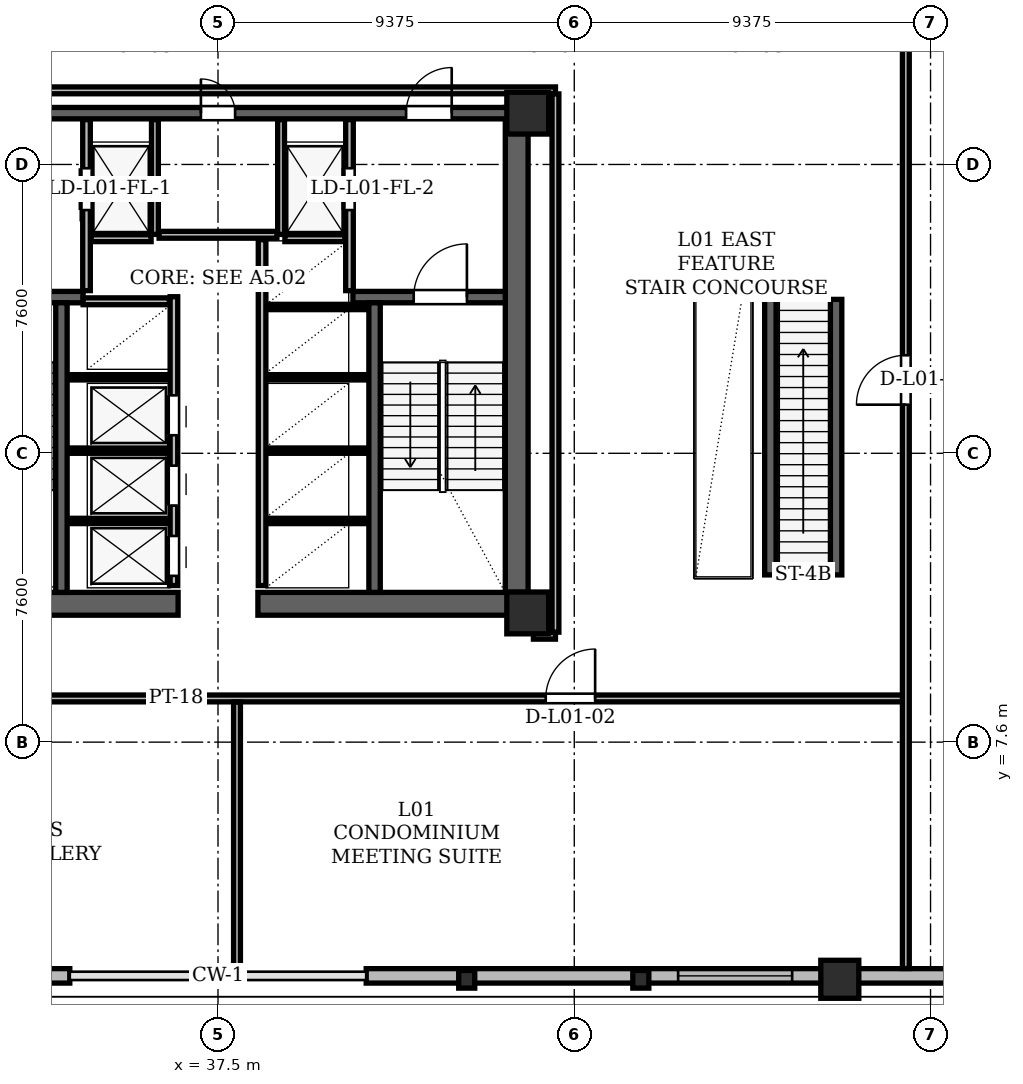
"""IFC4 building model, lengths in metres.
Left out: names, types, materials, properties, quantities, classifications, styles, units other than length and angle.
Written with IfcOpenShell. Run it as: python <this file> out.ifc"""

import sys

from ifc_helpers import new_model, si_unit, direction, frame, frame_2d, origin, origin_2d, place, context, subcontext, project, spatial, rectangle, hollow_rectangle, i_section, extrude, element, fill, save


model = new_model("IFC4")
c1 = context("Model", 3, precision=1e-05, world=origin(), true_north=direction((0.0, 1.0)))
c2 = subcontext(c1, "Body", "Model", "MODEL_VIEW")
j1 = project(units=[si_unit("LENGTHUNIT", "METRE"), si_unit("PLANEANGLEUNIT", "RADIAN")], contexts=[c1])
p1 = place(None, origin())
s1 = spatial("IfcSite", under=j1, at=p1, CompositionType="ELEMENT")
p2 = place(p1, origin())
s2 = spatial("IfcBuilding", under=s1, at=p2, CompositionType="ELEMENT")
p3 = place(p2, frame((0.0, 0.0, 5.4)))
s3 = spatial("IfcBuildingStorey", under=s2, at=p3, CompositionType="ELEMENT", Elevation=5.4)
for number, where, z_axis, x_axis in (
    (1, (45.65, 11.0, 0.0), (0.0, 0.0, 1.0), (1.0, 0.0, 0.0)),
    (2, (45.65, 24.15, 0.0), (0.0, 0.0, 1.0), (1.0, 0.0, 0.0)),
):
    element("IfcColumn", number, at=place(p3, frame(where, z_axis=z_axis, x_axis=x_axis)), inside=s3, PredefinedType="COLUMN", context=c2, shape_type="SweptSolid", body=[
        extrude(hollow_rectangle(XDim=1.1, YDim=1.1, WallThickness=0.09, at=origin_2d()), origin(), (0.0, 0.0, 1.0), 4.5),
    ])
p4 = place(p3, frame((53.862, 1.36, 0.005), z_axis=(0.0, 0.0, 1.0), x_axis=(1.0, 0.0, 0.0)))
e3 = element("IfcColumn", 3, at=p4, inside=s3, PredefinedType="COLUMN", context=c2, shape_type="SweptSolid", body=[
    extrude(hollow_rectangle(XDim=1.0, YDim=1.0, WallThickness=0.085, at=origin_2d()), origin(), (0.0, 0.0, 1.0), 4.491),
])
for number, where, z_axis, x_axis in (
    (4, (44.045, 1.36, 0.005), (0.0, 0.0, 1.0), (1.0, 0.0, 0.0)),
    (5, (48.626, 1.36, 0.005), (0.0, 0.0, 1.0), (1.0, 0.0, 0.0)),
):
    element("IfcColumn", number, at=place(p3, frame(where, z_axis=z_axis, x_axis=x_axis)), inside=s3, PredefinedType="COLUMN", context=c2, shape_type="SweptSolid", body=[
        extrude(i_section(OverallWidth=0.422, OverallDepth=0.465, WebThickness=0.045, FlangeThickness=0.072, at=origin_2d()), origin(), (0.0, 0.0, 1.0), 4.491),
    ])
p5 = place(p3, frame((45.36, 11.0, 0.0), z_axis=(0.0, 0.0, 1.0), x_axis=(0.0, 1.0, 0.0)))
e6 = element("IfcWall", 6, at=p5, inside=s3, PredefinedType="SHEAR", context=c2, shape_type="SweptSolid", body=[
    extrude(rectangle(XDim=13.3, YDim=0.6, at=frame_2d((6.65, 0.0))), origin(), (0.0, 0.0, 1.0), 4.22),
])
for number, where, z_axis, x_axis in (
    (7, (29.35, 11.24, 0.0), (0.0, 0.0, 1.0), (1.0, 0.0, 0.0)),
    (8, (38.55, 11.24, 0.0), (0.0, 0.0, 1.0), (1.0, 0.0, 0.0)),
):
    element("IfcWall", number, at=place(p3, frame(where, z_axis=z_axis, x_axis=x_axis)), inside=s3, PredefinedType="SHEAR", context=c2, shape_type="SweptSolid", body=[
        extrude(rectangle(XDim=7.1, YDim=0.6, at=frame_2d((3.55, 0.0))), origin(), (0.0, 0.0, 1.0), 4.22),
    ])
p6 = place(p3, frame((29.65, 24.15, 0.0), z_axis=(0.0, 0.0, 1.0), x_axis=(1.0, 0.0, 0.0)))
e9 = element("IfcWall", 9, at=p6, inside=s3, PredefinedType="SHEAR", context=c2, shape_type="SweptSolid", body=[
    extrude(rectangle(XDim=15.7, YDim=0.3, at=frame_2d((7.85, 0.0))), origin(), (0.0, 0.0, 1.0), 4.22),
])
p7 = place(p6, frame((1.7, 0.0, 0.0)))
e10 = element("IfcOpeningElement", 10, at=p7, cuts=e9, PredefinedType="OPENING", context=c2, shape_type="SweptSolid", body=[
    extrude(rectangle(XDim=1.2, YDim=2.2, at=frame_2d((0.6, 1.1))), frame((0.0, 0.15, 0.0), z_axis=(0.0, -1.0, 0.0), x_axis=(1.0, 0.0, 0.0)), (0.0, 0.0, 1.0), 0.3),
])
p8 = place(p6, frame((12.8, 0.0, 0.0)))
e11 = element("IfcOpeningElement", 11, at=p8, cuts=e9, PredefinedType="OPENING", context=c2, shape_type="SweptSolid", body=[
    extrude(rectangle(XDim=1.2, YDim=2.2, at=frame_2d((0.6, 1.1))), frame((0.0, 0.15, 0.0), z_axis=(0.0, -1.0, 0.0), x_axis=(1.0, 0.0, 0.0)), (0.0, 0.0, 1.0), 0.3),
])
p9 = place(p6, frame((7.4, 0.0, 0.0)))
e12 = element("IfcOpeningElement", 12, at=p9, cuts=e9, PredefinedType="OPENING", context=c2, shape_type="SweptSolid", body=[
    extrude(rectangle(XDim=0.9, YDim=2.05, at=frame_2d((0.45, 1.025))), frame((0.0, 0.15, 0.0), z_axis=(0.0, -1.0, 0.0), x_axis=(1.0, 0.0, 0.0)), (0.0, 0.0, 1.0), 0.3),
])
p10 = place(p3, frame((29.94, 19.31, 0.0), z_axis=(0.0, 0.0, 1.0), x_axis=(1.0, 0.0, 0.0)))
e13 = element("IfcWall", 13, at=p10, inside=s3, PredefinedType="SHEAR", context=c2, shape_type="SweptSolid", body=[
    extrude(rectangle(XDim=4.01, YDim=0.3, at=frame_2d((2.005, 0.0))), origin(), (0.0, 0.0, 1.0), 4.22),
])
p11 = place(p10, frame((1.01, 0.0, 0.0)))
e14 = element("IfcOpeningElement", 14, at=p11, cuts=e13, PredefinedType="OPENING", context=c2, shape_type="SweptSolid", body=[
    extrude(rectangle(XDim=1.4, YDim=2.2, at=frame_2d((0.7, 1.1))), frame((0.0, 0.15, 0.0), z_axis=(0.0, -1.0, 0.0), x_axis=(1.0, 0.0, 0.0)), (0.0, 0.0, 1.0), 0.3),
])
p12 = place(p3, frame((41.05, 19.31, 0.0), z_axis=(0.0, 0.0, 1.0), x_axis=(1.0, 0.0, 0.0)))
e15 = element("IfcWall", 15, at=p12, inside=s3, PredefinedType="SHEAR", context=c2, shape_type="SweptSolid", body=[
    extrude(rectangle(XDim=4.01, YDim=0.3, at=frame_2d((2.005, 0.0))), origin(), (0.0, 0.0, 1.0), 4.22),
])
p13 = place(p12, frame((1.6, 0.0, 0.0)))
e16 = element("IfcOpeningElement", 16, at=p13, cuts=e15, PredefinedType="OPENING", context=c2, shape_type="SweptSolid", body=[
    extrude(rectangle(XDim=1.4, YDim=2.2, at=frame_2d((0.7, 1.1))), frame((0.0, 0.15, 0.0), z_axis=(0.0, -1.0, 0.0), x_axis=(1.0, 0.0, 0.0)), (0.0, 0.0, 1.0), 0.3),
])
for number, where, z_axis, x_axis in (
    (17, (33.38, 11.54, 0.0), (0.0, 0.0, 1.0), (0.0, 1.0, 0.0)),
    (18, (41.62, 11.54, 0.0), (0.0, 0.0, 1.0), (0.0, 1.0, 0.0)),
):
    element("IfcWall", number, at=place(p3, frame(where, z_axis=z_axis, x_axis=x_axis)), inside=s3, PredefinedType="SHEAR", context=c2, shape_type="SweptSolid", body=[
        extrude(rectangle(XDim=7.62, YDim=0.3, at=frame_2d((3.81, 0.0))), origin(), (0.0, 0.0, 1.0), 4.22),
    ])
for number, where, z_axis, x_axis in (
    (19, (52.035, 12.0, 0.0), (0.0, 0.0, 1.0), (0.0, 1.0, 0.0)),
    (20, (53.765, 12.0, 0.0), (0.0, 0.0, 1.0), (0.0, 1.0, 0.0)),
):
    element("IfcWall", number, at=place(p3, frame(where, z_axis=z_axis, x_axis=x_axis)), inside=s3, PredefinedType="SHEAR", context=c2, shape_type="SweptSolid", body=[
        extrude(rectangle(XDim=7.25, YDim=0.3, at=frame_2d((3.625, 0.0))), origin(), (0.0, 0.0, 1.0), 4.22),
    ])
p14 = place(p3, frame((-1.072, 1.45, 0.0), z_axis=(0.0, 0.0, 1.0), x_axis=(1.0, 0.0, 0.0)))
e21 = element("IfcWall", 21, at=p14, inside=s3, PredefinedType="SOLIDWALL", context=c2, shape_type="SweptSolid", body=[
    extrude(rectangle(XDim=34.672, YDim=0.38, at=frame_2d((17.336, 0.0))), origin(), (0.0, 0.0, 1.0), 3.283),
])
p15 = place(p14, frame((8.208, 0.0, 0.85)))
e22 = element("IfcOpeningElement", 22, at=p15, cuts=e21, PredefinedType="OPENING", context=c2, shape_type="SweptSolid", body=[
    extrude(rectangle(XDim=3.0, YDim=2.25, at=frame_2d((1.5, 1.125))), frame((0.0, 0.19, 0.0), z_axis=(0.0, -1.0, 0.0), x_axis=(1.0, 0.0, 0.0)), (0.0, 0.0, 1.0), 0.38),
])
p16 = place(p14, frame((23.464, 0.0, 0.85)))
e23 = element("IfcOpeningElement", 23, at=p16, cuts=e21, PredefinedType="OPENING", context=c2, shape_type="SweptSolid", body=[
    extrude(rectangle(XDim=3.0, YDim=2.25, at=frame_2d((1.5, 1.125))), frame((0.0, 0.19, 0.0), z_axis=(0.0, -1.0, 0.0), x_axis=(1.0, 0.0, 0.0)), (0.0, 0.0, 1.0), 0.38),
])
p17 = place(p3, frame((41.4, 1.45, 0.0), z_axis=(0.0, 0.0, 1.0), x_axis=(1.0, 0.0, 0.0)))
e24 = element("IfcWall", 24, at=p17, inside=s3, PredefinedType="SOLIDWALL", context=c2, shape_type="SweptSolid", body=[
    extrude(rectangle(XDim=34.672, YDim=0.38, at=frame_2d((17.336, 0.0))), origin(), (0.0, 0.0, 1.0), 3.283),
])
p18 = place(p17, frame((8.208, 0.0, 0.85)))
e25 = element("IfcOpeningElement", 25, at=p18, cuts=e24, PredefinedType="OPENING", context=c2, shape_type="SweptSolid", body=[
    extrude(rectangle(XDim=3.0, YDim=2.25, at=frame_2d((1.5, 1.125))), frame((0.0, 0.19, 0.0), z_axis=(0.0, -1.0, 0.0), x_axis=(1.0, 0.0, 0.0)), (0.0, 0.0, 1.0), 0.38),
])
p19 = place(p17, frame((23.464, 0.0, 0.85)))
e26 = element("IfcOpeningElement", 26, at=p19, cuts=e24, PredefinedType="OPENING", context=c2, shape_type="SweptSolid", body=[
    extrude(rectangle(XDim=3.0, YDim=2.25, at=frame_2d((1.5, 1.125))), frame((0.0, 0.19, 0.0), z_axis=(0.0, -1.0, 0.0), x_axis=(1.0, 0.0, 0.0)), (0.0, 0.0, 1.0), 0.38),
])
p20 = place(p3, frame((34.04, 19.48, 0.0), z_axis=(0.0, 0.0, 1.0), x_axis=(0.0, 1.0, 0.0)))
e27 = element("IfcWall", 27, at=p20, inside=s3, PredefinedType="PARTITIONING", context=c2, shape_type="SweptSolid", body=[
    extrude(rectangle(XDim=4.5, YDim=0.2, at=frame_2d((2.25, 0.0))), origin(), (0.0, 0.0, 1.0), 3.26),
])
p21 = place(p20, frame((2.12, 0.0, 0.0)))
e28 = element("IfcOpeningElement", 28, at=p21, cuts=e27, PredefinedType="OPENING", context=c2, shape_type="SweptSolid", body=[
    extrude(rectangle(XDim=1.1, YDim=2.2, at=frame_2d((0.55, 1.1))), frame((0.0, 0.1, 0.0), z_axis=(0.0, -1.0, 0.0), x_axis=(1.0, 0.0, 0.0)), (0.0, 0.0, 1.0), 0.2),
])
p22 = place(p3, frame((35.84, 20.96, 0.0), z_axis=(0.0, 0.0, 1.0), x_axis=(0.0, 1.0, 0.0)))
e29 = element("IfcWall", 29, at=p22, inside=s3, PredefinedType="PARTITIONING", context=c2, shape_type="SweptSolid", body=[
    extrude(rectangle(XDim=3.02, YDim=0.18, at=frame_2d((1.51, 0.0))), origin(), (0.0, 0.0, 1.0), 3.26),
])
p23 = place(p3, frame((34.16, 20.86, 0.0), z_axis=(0.0, 0.0, 1.0), x_axis=(1.0, 0.0, 0.0)))
e30 = element("IfcWall", 30, at=p23, inside=s3, PredefinedType="PARTITIONING", context=c2, shape_type="SweptSolid", body=[
    extrude(rectangle(XDim=1.58, YDim=0.18, at=frame_2d((0.79, 0.0))), origin(), (0.0, 0.0, 1.0), 4.22),
])
p24 = place(p3, frame((40.96, 19.48, 0.0), z_axis=(0.0, 0.0, 1.0), x_axis=(0.0, 1.0, 0.0)))
e31 = element("IfcWall", 31, at=p24, inside=s3, PredefinedType="PARTITIONING", context=c2, shape_type="SweptSolid", body=[
    extrude(rectangle(XDim=4.5, YDim=0.2, at=frame_2d((2.25, 0.0))), origin(), (0.0, 0.0, 1.0), 3.26),
])
p25 = place(p24, frame((2.12, 0.0, 0.0)))
e32 = element("IfcOpeningElement", 32, at=p25, cuts=e31, PredefinedType="OPENING", context=c2, shape_type="SweptSolid", body=[
    extrude(rectangle(XDim=1.1, YDim=2.2, at=frame_2d((0.55, 1.1))), frame((0.0, 0.1, 0.0), z_axis=(0.0, -1.0, 0.0), x_axis=(1.0, 0.0, 0.0)), (0.0, 0.0, 1.0), 0.2),
])
p26 = place(p3, frame((39.16, 20.96, 0.0), z_axis=(0.0, 0.0, 1.0), x_axis=(0.0, 1.0, 0.0)))
e33 = element("IfcWall", 33, at=p26, inside=s3, PredefinedType="PARTITIONING", context=c2, shape_type="SweptSolid", body=[
    extrude(rectangle(XDim=3.02, YDim=0.18, at=frame_2d((1.51, 0.0))), origin(), (0.0, 0.0, 1.0), 3.26),
])
p27 = place(p3, frame((39.26, 20.86, 0.0), z_axis=(0.0, 0.0, 1.0), x_axis=(1.0, 0.0, 0.0)))
e34 = element("IfcWall", 34, at=p27, inside=s3, PredefinedType="PARTITIONING", context=c2, shape_type="SweptSolid", body=[
    extrude(rectangle(XDim=1.58, YDim=0.18, at=frame_2d((0.79, 0.0))), origin(), (0.0, 0.0, 1.0), 4.22),
])
p28 = place(p3, frame((36.34, 11.72, 0.0), z_axis=(0.0, 0.0, 1.0), x_axis=(0.0, 1.0, 0.0)))
e35 = element("IfcWall", 35, at=p28, inside=s3, PredefinedType="PARTITIONING", context=c2, shape_type="SweptSolid", body=[
    extrude(rectangle(XDim=7.6, YDim=0.2, at=frame_2d((3.8, 0.0))), origin(), (0.0, 0.0, 1.0), 4.22),
])
p29 = place(p28, frame((0.255, 0.0, 0.0)))
e36 = element("IfcOpeningElement", 36, at=p29, cuts=e35, PredefinedType="OPENING", context=c2, shape_type="SweptSolid", body=[
    extrude(rectangle(XDim=1.05, YDim=2.15, at=frame_2d((0.525, 1.075))), frame((0.0, 0.1, 0.0), z_axis=(0.0, -1.0, 0.0), x_axis=(1.0, 0.0, 0.0)), (0.0, 0.0, 1.0), 0.2),
])
p30 = place(p28, frame((2.105, 0.0, 0.0)))
e37 = element("IfcOpeningElement", 37, at=p30, cuts=e35, PredefinedType="OPENING", context=c2, shape_type="SweptSolid", body=[
    extrude(rectangle(XDim=1.05, YDim=2.15, at=frame_2d((0.525, 1.075))), frame((0.0, 0.1, 0.0), z_axis=(0.0, -1.0, 0.0), x_axis=(1.0, 0.0, 0.0)), (0.0, 0.0, 1.0), 0.2),
])
p31 = place(p28, frame((3.955, 0.0, 0.0)))
e38 = element("IfcOpeningElement", 38, at=p31, cuts=e35, PredefinedType="OPENING", context=c2, shape_type="SweptSolid", body=[
    extrude(rectangle(XDim=1.05, YDim=2.15, at=frame_2d((0.525, 1.075))), frame((0.0, 0.1, 0.0), z_axis=(0.0, -1.0, 0.0), x_axis=(1.0, 0.0, 0.0)), (0.0, 0.0, 1.0), 0.2),
])
p32 = place(p3, frame((33.95, 19.2, 0.0), z_axis=(0.0, 0.0, 1.0), x_axis=(1.0, 0.0, 0.0)))
e39 = element("IfcWall", 39, at=p32, inside=s3, PredefinedType="PARTITIONING", context=c2, shape_type="SweptSolid", body=[
    extrude(rectangle(XDim=2.27, YDim=0.18, at=frame_2d((1.135, 0.0))), origin(), (0.0, 0.0, 1.0), 4.22),
])
for number, where, z_axis, x_axis in (
    (40, (33.56, 13.42, 0.0), (0.0, 0.0, 1.0), (1.0, 0.0, 0.0)),
    (41, (33.56, 15.27, 0.0), (0.0, 0.0, 1.0), (1.0, 0.0, 0.0)),
    (42, (33.56, 17.2, 0.0), (0.0, 0.0, 1.0), (1.0, 0.0, 0.0)),
):
    element("IfcWall", number, at=place(p3, frame(where, z_axis=z_axis, x_axis=x_axis)), inside=s3, PredefinedType="PARTITIONING", context=c2, shape_type="SweptSolid", body=[
        extrude(rectangle(XDim=2.66, YDim=0.14, at=frame_2d((1.33, 0.0))), origin(), (0.0, 0.0, 1.0), 4.22),
    ])
p33 = place(p3, frame((38.66, 11.72, 0.0), z_axis=(0.0, 0.0, 1.0), x_axis=(0.0, 1.0, 0.0)))
e43 = element("IfcWall", 43, at=p33, inside=s3, PredefinedType="PARTITIONING", context=c2, shape_type="SweptSolid", body=[
    extrude(rectangle(XDim=9.1, YDim=0.2, at=frame_2d((4.55, 0.0))), origin(), (0.0, 0.0, 1.0), 4.22),
])
for number, where, z_axis, x_axis in (
    (44, (38.78, 13.42, 0.0), (0.0, 0.0, 1.0), (1.0, 0.0, 0.0)),
    (45, (38.78, 15.27, 0.0), (0.0, 0.0, 1.0), (1.0, 0.0, 0.0)),
    (46, (38.78, 17.2, 0.0), (0.0, 0.0, 1.0), (1.0, 0.0, 0.0)),
    (47, (38.78, 19.05, 0.0), (0.0, 0.0, 1.0), (1.0, 0.0, 0.0)),
):
    element("IfcWall", number, at=place(p3, frame(where, z_axis=z_axis, x_axis=x_axis)), inside=s3, PredefinedType="PARTITIONING", context=c2, shape_type="SweptSolid", body=[
        extrude(rectangle(XDim=2.66, YDim=0.14, at=frame_2d((1.33, 0.0))), origin(), (0.0, 0.0, 1.0), 4.22),
    ])
p34 = place(p3, frame((35.95, 20.95, 0.0), z_axis=(0.0, 0.0, 1.0), x_axis=(1.0, 0.0, 0.0)))
e48 = element("IfcWall", 48, at=p34, inside=s3, PredefinedType="PARTITIONING", context=c2, shape_type="SweptSolid", body=[
    extrude(rectangle(XDim=3.1, YDim=0.18, at=frame_2d((1.55, 0.0))), origin(), (0.0, 0.0, 1.0), 4.22),
])
p35 = place(p3, frame((14.03, 8.75, 0.0), z_axis=(0.0, 0.0, 1.0), x_axis=(1.0, 0.0, 0.0)))
e49 = element("IfcWall", 49, at=p35, inside=s3, PredefinedType="PARTITIONING", context=c2, shape_type="SweptSolid", body=[
    extrude(rectangle(XDim=41.57, YDim=0.18, at=frame_2d((20.785, 0.0))), origin(), (0.0, 0.0, 1.0), 3.283),
])
p36 = place(p35, frame((11.336, 0.0, 0.0)))
e50 = element("IfcOpeningElement", 50, at=p36, cuts=e49, PredefinedType="OPENING", context=c2, shape_type="SweptSolid", body=[
    extrude(rectangle(XDim=1.3, YDim=2.2, at=frame_2d((0.65, 1.1))), frame((0.0, 0.09, 0.0), z_axis=(0.0, -1.0, 0.0), x_axis=(1.0, 0.0, 0.0)), (0.0, 0.0, 1.0), 0.18),
])
p37 = place(p35, frame((32.094, 0.0, 0.0)))
e51 = element("IfcOpeningElement", 51, at=p37, cuts=e49, PredefinedType="OPENING", context=c2, shape_type="SweptSolid", body=[
    extrude(rectangle(XDim=1.3, YDim=2.2, at=frame_2d((0.65, 1.1))), frame((0.0, 0.09, 0.0), z_axis=(0.0, -1.0, 0.0), x_axis=(1.0, 0.0, 0.0)), (0.0, 0.0, 1.0), 0.18),
])
p38 = place(p3, frame((45.8, 10.4, 0.0), z_axis=(0.0, 0.0, 1.0), x_axis=(1.0, 0.0, 0.0)))
e52 = element("IfcWall", 52, at=p38, inside=s3, PredefinedType="PARTITIONING", context=c2, shape_type="SweptSolid", body=[
    extrude(rectangle(XDim=0.58, YDim=0.18, at=frame_2d((0.29, 0.0))), origin(), (0.0, 0.0, 1.0), 3.283),
])
p39 = place(p3, frame((28.62, 24.75, 0.0), z_axis=(0.0, 0.0, 1.0), x_axis=(1.0, 0.0, 0.0)))
e53 = element("IfcWall", 53, at=p39, inside=s3, PredefinedType="PARTITIONING", context=c2, shape_type="SweptSolid", body=[
    extrude(rectangle(XDim=17.76, YDim=0.18, at=frame_2d((8.88, 0.0))), origin(), (0.0, 0.0, 1.0), 3.283),
])
p40 = place(p3, frame((38.0, 1.564, 0.0), z_axis=(0.0, 0.0, 1.0), x_axis=(0.0, 1.0, 0.0)))
e54 = element("IfcWall", 54, at=p40, inside=s3, PredefinedType="PARTITIONING", context=c2, shape_type="SweptSolid", body=[
    extrude(rectangle(XDim=7.092, YDim=0.18, at=frame_2d((3.546, 0.0))), origin(), (0.0, 0.0, 1.0), 4.22),
])
p41 = place(p3, frame((46.38, 10.494, 0.0), z_axis=(0.0, 0.0, 1.0), x_axis=(0.0, 1.0, 0.0)))
e55 = element("IfcWall", 55, at=p41, inside=s3, PredefinedType="PARTITIONING", context=c2, shape_type="SweptSolid", body=[
    extrude(rectangle(XDim=14.162, YDim=0.18, at=frame_2d((7.081, 0.0))), origin(), (0.0, 0.0, 1.0), 4.22),
])
p42 = place(p3, frame((55.6, 1.644, 0.0), z_axis=(0.0, 0.0, 1.0), x_axis=(0.0, 1.0, 0.0)))
e56 = element("IfcWall", 56, at=p42, inside=s3, PredefinedType="PARTITIONING", context=c2, shape_type="SweptSolid", body=[
    extrude(rectangle(XDim=42.312, YDim=0.18, at=frame_2d((21.156, 0.0))), origin(), (0.0, 0.0, 1.0), 3.01),
])
p43 = place(p42, frame((14.835, 0.0, 0.0)))
e57 = element("IfcOpeningElement", 57, at=p43, cuts=e56, PredefinedType="OPENING", context=c2, shape_type="SweptSolid", body=[
    extrude(rectangle(XDim=1.3, YDim=2.2, at=frame_2d((0.65, 1.1))), frame((0.0, 0.09, 0.0), z_axis=(0.0, -1.0, 0.0), x_axis=(1.0, 0.0, 0.0)), (0.0, 0.0, 1.0), 0.18),
])
p44 = place(p18, origin())
e58 = element("IfcWindow", 58, at=p44, inside=s3, PartitioningType="SINGLE_PANEL", PredefinedType="WINDOW", context=c2, shape_type="SweptSolid", body=[
    extrude(rectangle(XDim=3.0, YDim=2.25, at=frame_2d((1.5, 1.125))), frame((0.0, 0.03, 0.0), z_axis=(0.0, -1.0, 0.0), x_axis=(1.0, 0.0, 0.0)), (0.0, 0.0, 1.0), 0.06),
])
fill(e25, e58)
p45 = place(p21, origin())
e59 = element("IfcDoor", 59, at=p45, inside=s3, OperationType="SLIDING_TO_LEFT", PredefinedType="DOOR", context=c2, shape_type="SweptSolid", body=[
    extrude(rectangle(XDim=1.1, YDim=2.2, at=frame_2d((0.55, 1.1))), frame((0.0, 0.025, 0.0), z_axis=(0.0, -1.0, 0.0), x_axis=(1.0, 0.0, 0.0)), (0.0, 0.0, 1.0), 0.05),
])
fill(e28, e59)
p46 = place(p25, origin())
e60 = element("IfcDoor", 60, at=p46, inside=s3, OperationType="SLIDING_TO_RIGHT", PredefinedType="DOOR", context=c2, shape_type="SweptSolid", body=[
    extrude(rectangle(XDim=1.1, YDim=2.2, at=frame_2d((0.55, 1.1))), frame((0.0, 0.025, 0.0), z_axis=(0.0, -1.0, 0.0), x_axis=(1.0, 0.0, 0.0)), (0.0, 0.0, 1.0), 0.05),
])
fill(e32, e60)
p47 = place(p29, origin())
e61 = element("IfcDoor", 61, at=p47, inside=s3, OperationType="SLIDING_TO_LEFT", PredefinedType="DOOR", context=c2, shape_type="SweptSolid", body=[
    extrude(rectangle(XDim=1.05, YDim=2.15, at=frame_2d((0.525, 1.075))), frame((0.0, 0.025, 0.0), z_axis=(0.0, -1.0, 0.0), x_axis=(1.0, 0.0, 0.0)), (0.0, 0.0, 1.0), 0.05),
])
fill(e36, e61)
p48 = place(p30, origin())
e62 = element("IfcDoor", 62, at=p48, inside=s3, OperationType="SLIDING_TO_RIGHT", PredefinedType="DOOR", context=c2, shape_type="SweptSolid", body=[
    extrude(rectangle(XDim=1.05, YDim=2.15, at=frame_2d((0.525, 1.075))), frame((0.0, 0.025, 0.0), z_axis=(0.0, -1.0, 0.0), x_axis=(1.0, 0.0, 0.0)), (0.0, 0.0, 1.0), 0.05),
])
fill(e37, e62)
p49 = place(p31, origin())
e63 = element("IfcDoor", 63, at=p49, inside=s3, OperationType="SLIDING_TO_LEFT", PredefinedType="DOOR", context=c2, shape_type="SweptSolid", body=[
    extrude(rectangle(XDim=1.05, YDim=2.15, at=frame_2d((0.525, 1.075))), frame((0.0, 0.025, 0.0), z_axis=(0.0, -1.0, 0.0), x_axis=(1.0, 0.0, 0.0)), (0.0, 0.0, 1.0), 0.05),
])
fill(e38, e63)
p50 = place(p13, origin())
e64 = element("IfcDoor", 64, at=p50, inside=s3, OperationType="SINGLE_SWING_RIGHT", PredefinedType="DOOR", context=c2, shape_type="SweptSolid", body=[
    extrude(rectangle(XDim=1.4, YDim=2.2, at=frame_2d((0.7, 1.1))), frame((0.0, 0.025, 0.0), z_axis=(0.0, -1.0, 0.0), x_axis=(1.0, 0.0, 0.0)), (0.0, 0.0, 1.0), 0.05),
])
fill(e16, e64)
p51 = place(p8, origin())
e65 = element("IfcDoor", 65, at=p51, inside=s3, OperationType="SINGLE_SWING_RIGHT", PredefinedType="DOOR", context=c2, shape_type="SweptSolid", body=[
    extrude(rectangle(XDim=1.2, YDim=2.2, at=frame_2d((0.6, 1.1))), frame((0.0, 0.025, 0.0), z_axis=(0.0, -1.0, 0.0), x_axis=(1.0, 0.0, 0.0)), (0.0, 0.0, 1.0), 0.05),
])
fill(e11, e65)
p52 = place(p9, origin())
e66 = element("IfcDoor", 66, at=p52, inside=s3, OperationType="SINGLE_SWING_LEFT", PredefinedType="DOOR", context=c2, shape_type="SweptSolid", body=[
    extrude(rectangle(XDim=0.9, YDim=2.05, at=frame_2d((0.45, 1.025))), frame((0.0, 0.025, 0.0), z_axis=(0.0, -1.0, 0.0), x_axis=(1.0, 0.0, 0.0)), (0.0, 0.0, 1.0), 0.05),
])
fill(e12, e66)
p53 = place(p37, origin())
e67 = element("IfcDoor", 67, at=p53, inside=s3, OperationType="SINGLE_SWING_RIGHT", PredefinedType="DOOR", context=c2, shape_type="SweptSolid", body=[
    extrude(rectangle(XDim=1.3, YDim=2.2, at=frame_2d((0.65, 1.1))), frame((0.0, 0.025, 0.0), z_axis=(0.0, -1.0, 0.0), x_axis=(1.0, 0.0, 0.0)), (0.0, 0.0, 1.0), 0.05),
])
fill(e51, e67)
p54 = place(p43, origin())
e68 = element("IfcDoor", 68, at=p54, inside=s3, OperationType="SINGLE_SWING_LEFT", PredefinedType="DOOR", context=c2, shape_type="SweptSolid", body=[
    extrude(rectangle(XDim=1.3, YDim=2.2, at=frame_2d((0.65, 1.1))), frame((0.0, 0.025, 0.0), z_axis=(0.0, -1.0, 0.0), x_axis=(1.0, 0.0, 0.0)), (0.0, 0.0, 1.0), 0.05),
])
fill(e57, e68)
save(model, sys.argv[1])
